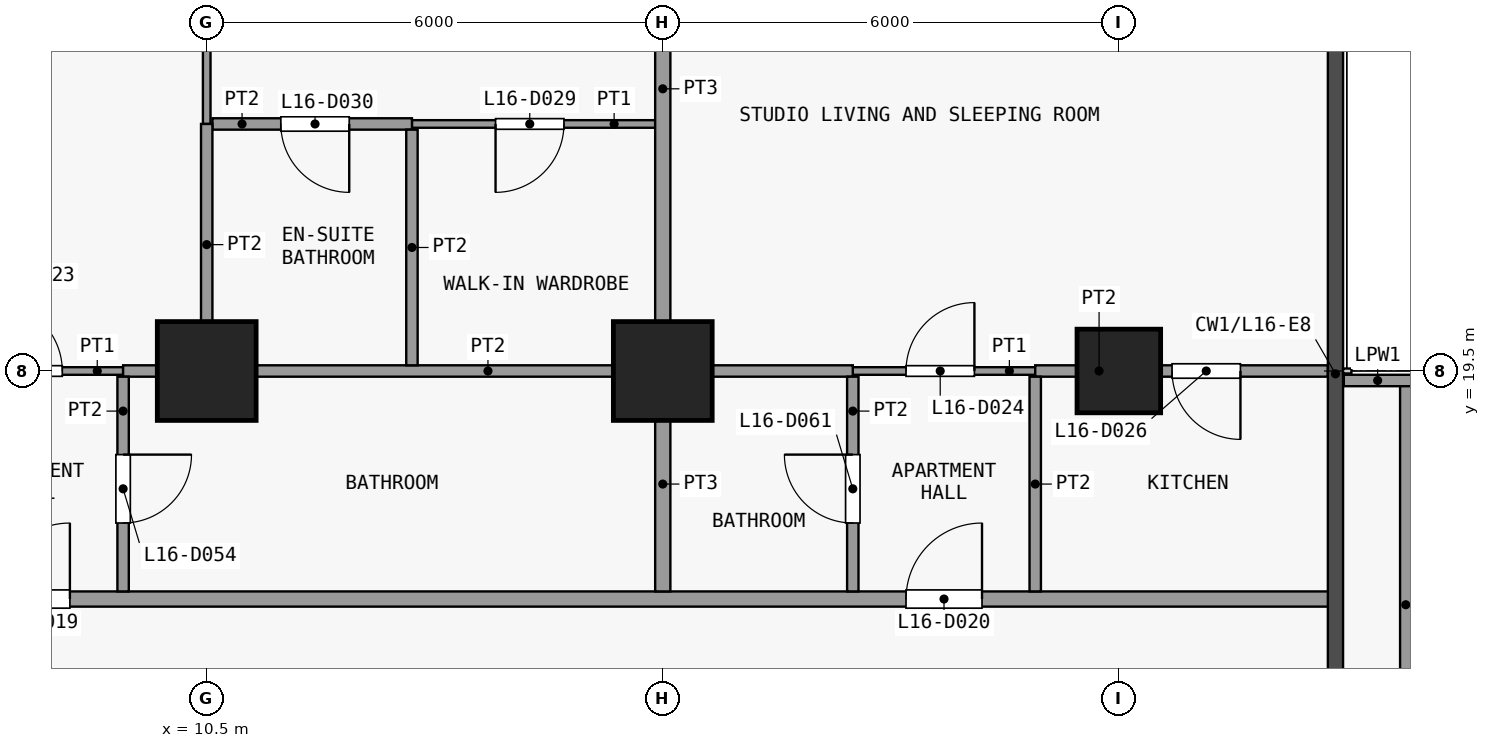
"""IFC4 building model, lengths in metres.
Left out: names, types, materials, properties, quantities, classifications, styles, units other than length and angle.
Written with IfcOpenShell. Run it as: python <this file> out.ifc"""

import sys

from ifc_helpers import new_model, si_unit, direction, frame, frame_2d, origin, origin_2d, place, context, subcontext, project, spatial, rectangle, extrude, element, fill, save


model = new_model("IFC4")
c1 = context("Model", 3, precision=1e-05, world=origin(), true_north=direction((0.0, 1.0)))
c2 = subcontext(c1, "Body", "Model", "MODEL_VIEW")
j1 = project(units=[si_unit("LENGTHUNIT", "METRE"), si_unit("PLANEANGLEUNIT", "RADIAN")], contexts=[c1])
p1 = place(None, origin())
s1 = spatial("IfcSite", under=j1, at=p1, CompositionType="ELEMENT")
p2 = place(p1, origin())
s2 = spatial("IfcBuilding", under=s1, at=p2, CompositionType="ELEMENT")
p3 = place(p2, frame((0.0, 0.0, 68.5)))
s3 = spatial("IfcBuildingStorey", under=s2, at=p3, CompositionType="ELEMENT", Elevation=68.5)
for number, where, z_axis, x_axis in (
    (1, (10.5, 19.5, 0.0), (0.0, 0.0, 1.0), (1.0, 0.0, 0.0)),
    (2, (16.5, 19.5, 0.0), (0.0, 0.0, 1.0), (1.0, 0.0, 0.0)),
):
    element("IfcColumn", number, at=place(p3, frame(where, z_axis=z_axis, x_axis=x_axis)), inside=s3, PredefinedType="COLUMN", context=c2, shape_type="SweptSolid", body=[
        extrude(rectangle(XDim=1.3, YDim=1.3, at=origin_2d()), origin(), (0.0, 0.0, 1.0), 3.6),
    ])
p4 = place(p3, frame((22.5, 19.5, 0.0), z_axis=(0.0, 0.0, 1.0), x_axis=(1.0, 0.0, 0.0)))
e3 = element("IfcColumn", 3, at=p4, inside=s3, PredefinedType="COLUMN", context=c2, shape_type="SweptSolid", body=[
    extrude(rectangle(XDim=1.1, YDim=1.1, at=origin_2d()), origin(), (0.0, 0.0, 1.0), 3.6),
])
p5 = place(p3, frame((25.46, 19.375, 0.0), z_axis=(0.0, 0.0, 1.0), x_axis=(1.0, 0.0, 0.0)))
e4 = element("IfcWall", 4, at=p5, inside=s3, PredefinedType="PARAPET", context=c2, shape_type="SweptSolid", body=[
    extrude(rectangle(XDim=0.89, YDim=0.15, at=frame_2d((0.445, 0.0))), origin(), (0.0, 0.0, 1.0), 1.15),
])
p6 = place(p3, frame((26.275, 19.3, 0.0), z_axis=(0.0, 0.0, 1.0), x_axis=(0.0, -1.0, 0.0)))
e5 = element("IfcWall", 5, at=p6, inside=s3, PredefinedType="PARAPET", context=c2, shape_type="SweptSolid", body=[
    extrude(rectangle(XDim=5.75, YDim=0.15, at=frame_2d((2.875, 0.0))), origin(), (0.0, 0.0, 1.0), 1.15),
])
p7 = place(p3, frame((-25.35, 16.5, 0.0), z_axis=(0.0, 0.0, 1.0), x_axis=(1.0, 0.0, 0.0)))
e6 = element("IfcWall", 6, at=p7, inside=s3, PredefinedType="PARTITIONING", context=c2, shape_type="SweptSolid", body=[
    extrude(rectangle(XDim=50.7, YDim=0.2, at=frame_2d((25.35, 0.0))), origin(), (0.0, 0.0, 1.0), 3.3),
])
p8 = place(p7, frame((4.55, 0.0, 0.0)))
e7 = element("IfcOpeningElement", 7, at=p8, cuts=e6, PredefinedType="OPENING", context=c2, shape_type="SweptSolid", body=[
    extrude(rectangle(XDim=1.0, YDim=2.1, at=frame_2d((0.5, 1.05))), frame((0.0, 0.11, 0.0), z_axis=(0.0, -1.0, 0.0), x_axis=(1.0, 0.0, 0.0)), (0.0, 0.0, 1.0), 0.22),
])
p9 = place(p7, frame((19.05, 0.0, 0.0)))
e8 = element("IfcOpeningElement", 8, at=p9, cuts=e6, PredefinedType="OPENING", context=c2, shape_type="SweptSolid", body=[
    extrude(rectangle(XDim=1.0, YDim=2.1, at=frame_2d((0.5, 1.05))), frame((0.0, 0.11, 0.0), z_axis=(0.0, -1.0, 0.0), x_axis=(1.0, 0.0, 0.0)), (0.0, 0.0, 1.0), 0.22),
])
p10 = place(p7, frame((33.05, 0.0, 0.0)))
e9 = element("IfcOpeningElement", 9, at=p10, cuts=e6, PredefinedType="OPENING", context=c2, shape_type="SweptSolid", body=[
    extrude(rectangle(XDim=1.0, YDim=2.1, at=frame_2d((0.5, 1.05))), frame((0.0, 0.11, 0.0), z_axis=(0.0, -1.0, 0.0), x_axis=(1.0, 0.0, 0.0)), (0.0, 0.0, 1.0), 0.22),
])
p11 = place(p7, frame((45.05, 0.0, 0.0)))
e10 = element("IfcOpeningElement", 10, at=p11, cuts=e6, PredefinedType="OPENING", context=c2, shape_type="SweptSolid", body=[
    extrude(rectangle(XDim=1.0, YDim=2.1, at=frame_2d((0.5, 1.05))), frame((0.0, 0.11, 0.0), z_axis=(0.0, -1.0, 0.0), x_axis=(1.0, 0.0, 0.0)), (0.0, 0.0, 1.0), 0.22),
])
p12 = place(p3, frame((7.0, 19.5, 0.0), z_axis=(0.0, 0.0, 1.0), x_axis=(1.0, 0.0, 0.0)))
e11 = element("IfcWall", 11, at=p12, inside=s3, PredefinedType="PARTITIONING", context=c2, shape_type="SweptSolid", body=[
    extrude(rectangle(XDim=2.4, YDim=0.1, at=frame_2d((1.2, 0.0))), origin(), (0.0, 0.0, 1.0), 3.3),
])
p13 = place(p12, frame((0.7, 0.0, 0.0)))
e12 = element("IfcOpeningElement", 12, at=p13, cuts=e11, PredefinedType="OPENING", context=c2, shape_type="SweptSolid", body=[
    extrude(rectangle(XDim=0.9, YDim=2.1, at=frame_2d((0.45, 1.05))), frame((0.0, 0.06, 0.0), z_axis=(0.0, -1.0, 0.0), x_axis=(1.0, 0.0, 0.0)), (0.0, 0.0, 1.0), 0.12),
])
p14 = place(p3, frame((19.0, 19.5, 0.0), z_axis=(0.0, 0.0, 1.0), x_axis=(1.0, 0.0, 0.0)))
e13 = element("IfcWall", 13, at=p14, inside=s3, PredefinedType="PARTITIONING", context=c2, shape_type="SweptSolid", body=[
    extrude(rectangle(XDim=2.4, YDim=0.1, at=frame_2d((1.2, 0.0))), origin(), (0.0, 0.0, 1.0), 3.3),
])
p15 = place(p14, frame((0.7, 0.0, 0.0)))
e14 = element("IfcOpeningElement", 14, at=p15, cuts=e13, PredefinedType="OPENING", context=c2, shape_type="SweptSolid", body=[
    extrude(rectangle(XDim=0.9, YDim=2.1, at=frame_2d((0.45, 1.05))), frame((0.0, 0.06, 0.0), z_axis=(0.0, -1.0, 0.0), x_axis=(1.0, 0.0, 0.0)), (0.0, 0.0, 1.0), 0.12),
])
p16 = place(p3, frame((9.4, 19.5, 0.0), z_axis=(0.0, 0.0, 1.0), x_axis=(1.0, 0.0, 0.0)))
e15 = element("IfcWall", 15, at=p16, inside=s3, PredefinedType="PARTITIONING", context=c2, shape_type="SweptSolid", body=[
    extrude(rectangle(XDim=9.6, YDim=0.15, at=frame_2d((4.8, 0.0))), origin(), (0.0, 0.0, 1.0), 3.3),
])
p17 = place(p3, frame((21.4, 19.5, 0.0), z_axis=(0.0, 0.0, 1.0), x_axis=(1.0, 0.0, 0.0)))
e16 = element("IfcWall", 16, at=p17, inside=s3, PredefinedType="PARTITIONING", context=c2, shape_type="SweptSolid", body=[
    extrude(rectangle(XDim=3.85, YDim=0.15, at=frame_2d((1.925, 0.0))), origin(), (0.0, 0.0, 1.0), 3.3),
])
p18 = place(p17, frame((1.8, 0.0, 0.0)))
e17 = element("IfcOpeningElement", 17, at=p18, cuts=e16, PredefinedType="OPENING", context=c2, shape_type="SweptSolid", body=[
    extrude(rectangle(XDim=0.9, YDim=2.1, at=frame_2d((0.45, 1.05))), frame((0.0, 0.085, 0.0), z_axis=(0.0, -1.0, 0.0), x_axis=(1.0, 0.0, 0.0)), (0.0, 0.0, 1.0), 0.17),
])
p19 = place(p3, frame((13.2, 22.75, 0.0), z_axis=(0.0, 0.0, 1.0), x_axis=(1.0, 0.0, 0.0)))
e18 = element("IfcWall", 18, at=p19, inside=s3, PredefinedType="PARTITIONING", context=c2, shape_type="SweptSolid", body=[
    extrude(rectangle(XDim=3.2, YDim=0.1, at=frame_2d((1.6, 0.0))), origin(), (0.0, 0.0, 1.0), 3.3),
])
p20 = place(p19, frame((1.1, 0.0, 0.0)))
e19 = element("IfcOpeningElement", 19, at=p20, cuts=e18, PredefinedType="OPENING", context=c2, shape_type="SweptSolid", body=[
    extrude(rectangle(XDim=0.9, YDim=2.1, at=frame_2d((0.45, 1.05))), frame((0.0, 0.06, 0.0), z_axis=(0.0, -1.0, 0.0), x_axis=(1.0, 0.0, 0.0)), (0.0, 0.0, 1.0), 0.12),
])
p21 = place(p3, frame((10.575, 22.75, 0.0), z_axis=(0.0, 0.0, 1.0), x_axis=(1.0, 0.0, 0.0)))
e20 = element("IfcWall", 20, at=p21, inside=s3, PredefinedType="PARTITIONING", context=c2, shape_type="SweptSolid", body=[
    extrude(rectangle(XDim=2.625, YDim=0.15, at=frame_2d((1.312, 0.0))), origin(), (0.0, 0.0, 1.0), 3.3),
])
p22 = place(p21, frame((0.9, 0.0, 0.0)))
e21 = element("IfcOpeningElement", 21, at=p22, cuts=e20, PredefinedType="OPENING", context=c2, shape_type="SweptSolid", body=[
    extrude(rectangle(XDim=0.9, YDim=2.1, at=frame_2d((0.45, 1.05))), frame((0.0, 0.085, 0.0), z_axis=(0.0, -1.0, 0.0), x_axis=(1.0, 0.0, 0.0)), (0.0, 0.0, 1.0), 0.17),
])
p23 = place(p3, frame((9.4, 16.6, 0.0), z_axis=(0.0, 0.0, 1.0), x_axis=(0.0, 1.0, 0.0)))
e22 = element("IfcWall", 22, at=p23, inside=s3, PredefinedType="PARTITIONING", context=c2, shape_type="SweptSolid", body=[
    extrude(rectangle(XDim=2.825, YDim=0.15, at=frame_2d((1.413, 0.0))), origin(), (0.0, 0.0, 1.0), 3.3),
])
p24 = place(p23, frame((0.9, 0.0, 0.0)))
e23 = element("IfcOpeningElement", 23, at=p24, cuts=e22, PredefinedType="OPENING", context=c2, shape_type="SweptSolid", body=[
    extrude(rectangle(XDim=0.9, YDim=2.1, at=frame_2d((0.45, 1.05))), frame((0.0, 0.085, 0.0), z_axis=(0.0, -1.0, 0.0), x_axis=(1.0, 0.0, 0.0)), (0.0, 0.0, 1.0), 0.17),
])
p25 = place(p3, frame((10.5, 22.75, 0.0), z_axis=(0.0, 0.0, 1.0), x_axis=(0.0, 1.0, 0.0)))
e24 = element("IfcWall", 24, at=p25, inside=s3, PredefinedType="PARTITIONING", context=c2, shape_type="SweptSolid", body=[
    extrude(rectangle(XDim=4.1, YDim=0.1, at=frame_2d((2.05, 0.0))), origin(), (0.0, 0.0, 1.0), 3.3),
])
p26 = place(p25, frame((1.2, 0.0, 0.0)))
e25 = element("IfcOpeningElement", 25, at=p26, cuts=e24, PredefinedType="OPENING", context=c2, shape_type="SweptSolid", body=[
    extrude(rectangle(XDim=0.9, YDim=2.1, at=frame_2d((0.45, 1.05))), frame((0.0, 0.06, 0.0), z_axis=(0.0, -1.0, 0.0), x_axis=(1.0, 0.0, 0.0)), (0.0, 0.0, 1.0), 0.12),
])
p27 = place(p3, frame((10.5, 19.575, 0.0), z_axis=(0.0, 0.0, 1.0), x_axis=(0.0, 1.0, 0.0)))
e26 = element("IfcWall", 26, at=p27, inside=s3, PredefinedType="PARTITIONING", context=c2, shape_type="SweptSolid", body=[
    extrude(rectangle(XDim=3.175, YDim=0.15, at=frame_2d((1.587, 0.0))), origin(), (0.0, 0.0, 1.0), 3.3),
])
p28 = place(p3, frame((13.2, 19.575, 0.0), z_axis=(0.0, 0.0, 1.0), x_axis=(0.0, 1.0, 0.0)))
e27 = element("IfcWall", 27, at=p28, inside=s3, PredefinedType="PARTITIONING", context=c2, shape_type="SweptSolid", body=[
    extrude(rectangle(XDim=3.1, YDim=0.15, at=frame_2d((1.55, 0.0))), origin(), (0.0, 0.0, 1.0), 3.3),
])
p29 = place(p3, frame((16.5, 16.6, 0.0), z_axis=(0.0, 0.0, 1.0), x_axis=(0.0, 1.0, 0.0)))
e28 = element("IfcWall", 28, at=p29, inside=s3, PredefinedType="PARTITIONING", context=c2, shape_type="SweptSolid", body=[
    extrude(rectangle(XDim=2.825, YDim=0.2, at=frame_2d((1.413, 0.0))), origin(), (0.0, 0.0, 1.0), 3.3),
])
p30 = place(p3, frame((16.5, 19.575, 0.0), z_axis=(0.0, 0.0, 1.0), x_axis=(0.0, 1.0, 0.0)))
e29 = element("IfcWall", 29, at=p30, inside=s3, PredefinedType="PARTITIONING", context=c2, shape_type="SweptSolid", body=[
    extrude(rectangle(XDim=7.275, YDim=0.2, at=frame_2d((3.638, 0.0))), origin(), (0.0, 0.0, 1.0), 3.3),
])
p31 = place(p3, frame((19.0, 16.6, 0.0), z_axis=(0.0, 0.0, 1.0), x_axis=(0.0, 1.0, 0.0)))
e30 = element("IfcWall", 30, at=p31, inside=s3, PredefinedType="PARTITIONING", context=c2, shape_type="SweptSolid", body=[
    extrude(rectangle(XDim=2.825, YDim=0.15, at=frame_2d((1.413, 0.0))), origin(), (0.0, 0.0, 1.0), 3.3),
])
p32 = place(p31, frame((0.9, 0.0, 0.0)))
e31 = element("IfcOpeningElement", 31, at=p32, cuts=e30, PredefinedType="OPENING", context=c2, shape_type="SweptSolid", body=[
    extrude(rectangle(XDim=0.9, YDim=2.1, at=frame_2d((0.45, 1.05))), frame((0.0, 0.085, 0.0), z_axis=(0.0, -1.0, 0.0), x_axis=(1.0, 0.0, 0.0)), (0.0, 0.0, 1.0), 0.17),
])
p33 = place(p3, frame((21.4, 16.6, 0.0), z_axis=(0.0, 0.0, 1.0), x_axis=(0.0, 1.0, 0.0)))
e32 = element("IfcWall", 32, at=p33, inside=s3, PredefinedType="PARTITIONING", context=c2, shape_type="SweptSolid", body=[
    extrude(rectangle(XDim=2.825, YDim=0.15, at=frame_2d((1.413, 0.0))), origin(), (0.0, 0.0, 1.0), 3.3),
])
p34 = place(p10, origin())
e33 = element("IfcDoor", 33, at=p34, inside=s3, OperationType="SINGLE_SWING_LEFT", PredefinedType="DOOR", context=c2, shape_type="SweptSolid", body=[
    extrude(rectangle(XDim=1.0, YDim=2.1, at=frame_2d((0.5, 1.05))), frame((0.0, 0.025, 0.0), z_axis=(0.0, -1.0, 0.0), x_axis=(1.0, 0.0, 0.0)), (0.0, 0.0, 1.0), 0.05),
])
fill(e9, e33)
p35 = place(p11, origin())
e34 = element("IfcDoor", 34, at=p35, inside=s3, OperationType="SINGLE_SWING_LEFT", PredefinedType="DOOR", context=c2, shape_type="SweptSolid", body=[
    extrude(rectangle(XDim=1.0, YDim=2.1, at=frame_2d((0.5, 1.05))), frame((0.0, 0.025, 0.0), z_axis=(0.0, -1.0, 0.0), x_axis=(1.0, 0.0, 0.0)), (0.0, 0.0, 1.0), 0.05),
])
fill(e10, e34)
p36 = place(p13, origin())
e35 = element("IfcDoor", 35, at=p36, inside=s3, OperationType="SINGLE_SWING_RIGHT", PredefinedType="DOOR", context=c2, shape_type="SweptSolid", body=[
    extrude(rectangle(XDim=0.9, YDim=2.1, at=frame_2d((0.45, 1.05))), frame((0.0, 0.025, 0.0), z_axis=(0.0, -1.0, 0.0), x_axis=(1.0, 0.0, 0.0)), (0.0, 0.0, 1.0), 0.05),
])
fill(e12, e35)
p37 = place(p15, origin())
e36 = element("IfcDoor", 36, at=p37, inside=s3, OperationType="SINGLE_SWING_LEFT", PredefinedType="DOOR", context=c2, shape_type="SweptSolid", body=[
    extrude(rectangle(XDim=0.9, YDim=2.1, at=frame_2d((0.45, 1.05))), frame((0.0, 0.025, 0.0), z_axis=(0.0, -1.0, 0.0), x_axis=(1.0, 0.0, 0.0)), (0.0, 0.0, 1.0), 0.05),
])
fill(e14, e36)
p38 = place(p18, origin())
e37 = element("IfcDoor", 37, at=p38, inside=s3, OperationType="SINGLE_SWING_RIGHT", PredefinedType="DOOR", context=c2, shape_type="SweptSolid", body=[
    extrude(rectangle(XDim=0.9, YDim=2.1, at=frame_2d((0.45, 1.05))), frame((0.0, 0.025, 0.0), z_axis=(0.0, -1.0, 0.0), x_axis=(1.0, 0.0, 0.0)), (0.0, 0.0, 1.0), 0.05),
])
fill(e17, e37)
p39 = place(p20, origin())
e38 = element("IfcDoor", 38, at=p39, inside=s3, OperationType="SINGLE_SWING_LEFT", PredefinedType="DOOR", context=c2, shape_type="SweptSolid", body=[
    extrude(rectangle(XDim=0.9, YDim=2.1, at=frame_2d((0.45, 1.05))), frame((0.0, 0.025, 0.0), z_axis=(0.0, -1.0, 0.0), x_axis=(1.0, 0.0, 0.0)), (0.0, 0.0, 1.0), 0.05),
])
fill(e19, e38)
p40 = place(p22, origin())
e39 = element("IfcDoor", 39, at=p40, inside=s3, OperationType="SINGLE_SWING_RIGHT", PredefinedType="DOOR", context=c2, shape_type="SweptSolid", body=[
    extrude(rectangle(XDim=0.9, YDim=2.1, at=frame_2d((0.45, 1.05))), frame((0.0, 0.025, 0.0), z_axis=(0.0, -1.0, 0.0), x_axis=(1.0, 0.0, 0.0)), (0.0, 0.0, 1.0), 0.05),
])
fill(e21, e39)
p41 = place(p24, origin())
e40 = element("IfcDoor", 40, at=p41, inside=s3, OperationType="SINGLE_SWING_RIGHT", PredefinedType="DOOR", context=c2, shape_type="SweptSolid", body=[
    extrude(rectangle(XDim=0.9, YDim=2.1, at=frame_2d((0.45, 1.05))), frame((0.0, 0.025, 0.0), z_axis=(0.0, -1.0, 0.0), x_axis=(1.0, 0.0, 0.0)), (0.0, 0.0, 1.0), 0.05),
])
fill(e23, e40)
p42 = place(p32, origin())
e41 = element("IfcDoor", 41, at=p42, inside=s3, OperationType="SINGLE_SWING_LEFT", PredefinedType="DOOR", context=c2, shape_type="SweptSolid", body=[
    extrude(rectangle(XDim=0.9, YDim=2.1, at=frame_2d((0.45, 1.05))), frame((0.0, 0.025, 0.0), z_axis=(0.0, -1.0, 0.0), x_axis=(1.0, 0.0, 0.0)), (0.0, 0.0, 1.0), 0.05),
])
fill(e31, e41)
save(model, sys.argv[1])
